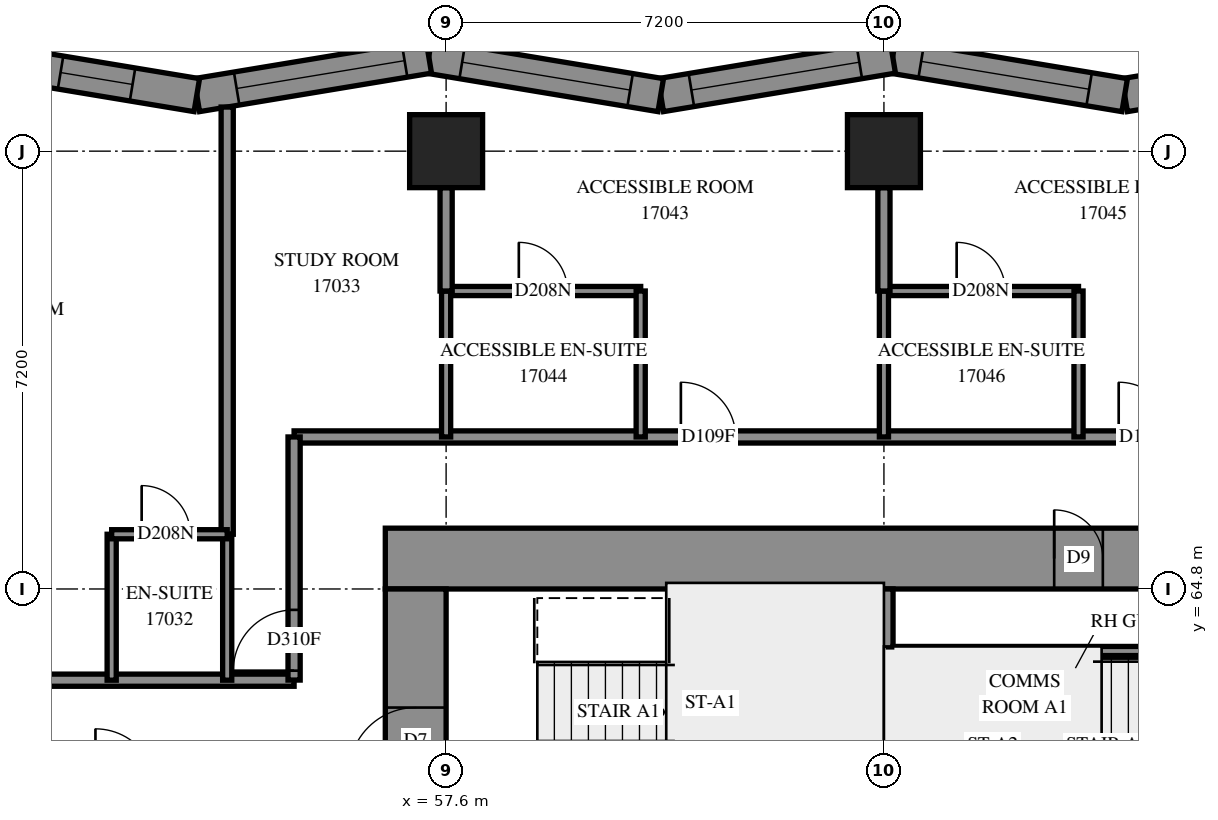
"""IFC4 building model, lengths in metres.
Left out: names, types, materials, properties, quantities, classifications, styles, units other than length and angle.
Written with IfcOpenShell. Run it as: python <this file> out.ifc"""

import sys

from ifc_helpers import new_model, si_unit, direction, frame, frame_2d, origin, origin_2d, place, context, subcontext, project, spatial, polyline, rectangle, outline, extrude, element, fill, save


model = new_model("IFC4")
c1 = context("Model", 3, precision=1e-05, world=origin(), true_north=direction((0.0, 1.0)))
c2 = subcontext(c1, "Body", "Model", "MODEL_VIEW")
j1 = project(units=[si_unit("LENGTHUNIT", "METRE"), si_unit("PLANEANGLEUNIT", "RADIAN")], contexts=[c1])
p1 = place(None, origin())
s1 = spatial("IfcSite", under=j1, at=p1, CompositionType="ELEMENT")
p2 = place(p1, origin())
s2 = spatial("IfcBuilding", under=s1, at=p2, CompositionType="ELEMENT")
p3 = place(p2, frame((0.0, 0.0, 64.4)))
s3 = spatial("IfcBuildingStorey", under=s2, at=p3, CompositionType="ELEMENT", Elevation=64.4)
for number, where, z_axis, x_axis in (
    (1, (57.6, 72.0, 0.0), (0.0, 0.0, 1.0), (1.0, 0.0, 0.0)),
    (2, (64.8, 72.0, 0.0), (0.0, 0.0, 1.0), (1.0, 0.0, 0.0)),
):
    element("IfcColumn", number, at=place(p3, frame(where, z_axis=z_axis, x_axis=x_axis)), inside=s3, PredefinedType="COLUMN", context=c2, shape_type="SweptSolid", body=[
        extrude(rectangle(XDim=1.2, YDim=1.2, at=origin_2d()), origin(), (0.0, 0.0, 1.0), 3.1),
    ])
p4 = place(p3, frame((56.6, 65.3, -0.3), z_axis=(0.0, 0.0, 1.0), x_axis=(1.0, 0.0, 0.0)))
e3 = element("IfcWall", 3, at=p4, inside=s3, PredefinedType="SHEAR", context=c2, shape_type="SweptSolid", body=[
    extrude(rectangle(XDim=16.4, YDim=1.0, at=frame_2d((8.2, 0.0))), origin(), (0.0, 0.0, 1.0), 2.7),
])
p5 = place(p4, frame((11.0, 0.0, 0.3)))
e4 = element("IfcOpeningElement", 4, at=p5, cuts=e3, PredefinedType="OPENING", context=c2, shape_type="SweptSolid", body=[
    extrude(rectangle(XDim=0.8, YDim=2.1, at=frame_2d((0.4, 1.05))), frame((0.0, 0.51, 0.0), z_axis=(0.0, -1.0, 0.0), x_axis=(1.0, 0.0, 0.0)), (0.0, 0.0, 1.0), 1.02),
])
p6 = place(p3, frame((57.1, 50.4, -0.3), z_axis=(0.0, 0.0, 1.0), x_axis=(0.0, 1.0, 0.0)))
e5 = element("IfcWall", 5, at=p6, inside=s3, PredefinedType="SHEAR", context=c2, shape_type="SweptSolid", body=[
    extrude(rectangle(XDim=14.4, YDim=1.0, at=frame_2d((7.2, 0.0))), origin(), (0.0, 0.0, 1.0), 2.7),
])
p7 = place(p6, frame((4.55, 0.0, 0.3)))
e6 = element("IfcOpeningElement", 6, at=p7, cuts=e5, PredefinedType="OPENING", context=c2, shape_type="SweptSolid", body=[
    extrude(rectangle(XDim=1.1, YDim=2.1, at=frame_2d((0.55, 1.05))), frame((0.0, 0.51, 0.0), z_axis=(0.0, -1.0, 0.0), x_axis=(1.0, 0.0, 0.0)), (0.0, 0.0, 1.0), 1.02),
])
p8 = place(p6, frame((11.35, 0.0, 0.3)))
e7 = element("IfcOpeningElement", 7, at=p8, cuts=e5, PredefinedType="OPENING", context=c2, shape_type="SweptSolid", body=[
    extrude(rectangle(XDim=1.1, YDim=2.1, at=frame_2d((0.55, 1.05))), frame((0.0, 0.51, 0.0), z_axis=(0.0, -1.0, 0.0), x_axis=(1.0, 0.0, 0.0)), (0.0, 0.0, 1.0), 1.02),
])
p9 = place(p3, frame((64.8, 60.6, 0.0), z_axis=(0.0, 0.0, 1.0), x_axis=(0.0, 1.0, 0.0)))
e8 = element("IfcWall", 8, at=p9, inside=s3, PredefinedType="SOLIDWALL", context=c2, shape_type="SweptSolid", body=[
    extrude(rectangle(XDim=4.2, YDim=0.3, at=frame_2d((2.1, 0.0))), origin(), (0.0, 0.0, 1.0), 3.1),
])
p10 = place(p3, frame((72.574, 73.554, 0.0), z_axis=(0.0, 0.0, 1.0), x_axis=(-0.9865110911, -0.1636944324, 0.0)))
e9 = element("IfcWall", 9, at=p10, inside=s3, PredefinedType="SOLIDWALL", context=c2, shape_type="SweptSolid", body=[
    extrude(outline(polyline([(-0.046, -0.275), (3.821, -0.275), (3.913, 0.275), (0.046, 0.275), (-0.046, -0.275)])), origin(), (0.0, 0.0, 1.0), 3.1),
])
p11 = place(p10, frame((0.724, 0.0, 0.5)))
e10 = element("IfcOpeningElement", 10, at=p11, cuts=e9, PredefinedType="OPENING", context=c2, shape_type="SweptSolid", body=[
    extrude(rectangle(XDim=2.8, YDim=2.45, at=frame_2d((1.4, 1.225))), frame((0.0, 0.285, 0.0), z_axis=(0.0, -1.0, 0.0), x_axis=(1.0, 0.0, 0.0)), (0.0, 0.0, 1.0), 0.57),
])
p12 = place(p3, frame((68.759, 72.921, 0.0), z_axis=(0.0, 0.0, 1.0), x_axis=(-0.9865110911, 0.1636944324, 0.0)))
e11 = element("IfcWall", 11, at=p12, inside=s3, PredefinedType="SOLIDWALL", context=c2, shape_type="SweptSolid", body=[
    extrude(outline(polyline([(0.046, -0.275), (3.913, -0.275), (3.821, 0.275), (-0.046, 0.275), (0.046, -0.275)])), origin(), (0.0, 0.0, 1.0), 3.1),
])
p13 = place(p12, frame((0.593, 0.0, 0.5)))
e12 = element("IfcOpeningElement", 12, at=p13, cuts=e11, PredefinedType="OPENING", context=c2, shape_type="SweptSolid", body=[
    extrude(rectangle(XDim=2.8, YDim=2.45, at=frame_2d((1.4, 1.225))), frame((0.0, 0.285, 0.0), z_axis=(0.0, -1.0, 0.0), x_axis=(1.0, 0.0, 0.0)), (0.0, 0.0, 1.0), 0.57),
])
p14 = place(p3, frame((64.944, 73.554, 0.0), z_axis=(0.0, 0.0, 1.0), x_axis=(-0.9865103981, -0.1636986085, 0.0)))
e13 = element("IfcWall", 13, at=p14, inside=s3, PredefinedType="SOLIDWALL", context=c2, shape_type="SweptSolid", body=[
    extrude(outline(polyline([(-0.046, -0.275), (3.821, -0.275), (3.913, 0.275), (0.046, 0.275), (-0.046, -0.275)])), origin(), (0.0, 0.0, 1.0), 3.1),
])
p15 = place(p14, frame((0.556, 0.0, 0.5)))
e14 = element("IfcOpeningElement", 14, at=p15, cuts=e13, PredefinedType="OPENING", context=c2, shape_type="SweptSolid", body=[
    extrude(rectangle(XDim=2.8, YDim=2.45, at=frame_2d((1.4, 1.225))), frame((0.0, 0.285, 0.0), z_axis=(0.0, -1.0, 0.0), x_axis=(1.0, 0.0, 0.0)), (0.0, 0.0, 1.0), 0.57),
])
p16 = place(p3, frame((61.13, 72.921, 0.0), z_axis=(0.0, 0.0, 1.0), x_axis=(-0.9865110911, 0.1636944324, 0.0)))
e15 = element("IfcWall", 15, at=p16, inside=s3, PredefinedType="SOLIDWALL", context=c2, shape_type="SweptSolid", body=[
    extrude(outline(polyline([(0.046, -0.275), (3.913, -0.275), (3.821, 0.275), (-0.046, 0.275), (0.046, -0.275)])), origin(), (0.0, 0.0, 1.0), 3.1),
])
p17 = place(p16, frame((0.511, 0.0, 0.5)))
e16 = element("IfcOpeningElement", 16, at=p17, cuts=e15, PredefinedType="OPENING", context=c2, shape_type="SweptSolid", body=[
    extrude(rectangle(XDim=2.8, YDim=2.45, at=frame_2d((1.4, 1.225))), frame((0.0, 0.285, 0.0), z_axis=(0.0, -1.0, 0.0), x_axis=(1.0, 0.0, 0.0)), (0.0, 0.0, 1.0), 0.57),
])
p18 = place(p3, frame((57.315, 73.554, 0.0), z_axis=(0.0, 0.0, 1.0), x_axis=(-0.9865110911, -0.1636944324, 0.0)))
e17 = element("IfcWall", 17, at=p18, inside=s3, PredefinedType="SOLIDWALL", context=c2, shape_type="SweptSolid", body=[
    extrude(outline(polyline([(-0.046, -0.275), (3.821, -0.275), (3.913, 0.275), (0.046, 0.275), (-0.046, -0.275)])), origin(), (0.0, 0.0, 1.0), 3.1),
])
p19 = place(p18, frame((0.403, 0.0, 0.5)))
e18 = element("IfcOpeningElement", 18, at=p19, cuts=e17, PredefinedType="OPENING", context=c2, shape_type="SweptSolid", body=[
    extrude(rectangle(XDim=2.8, YDim=2.45, at=frame_2d((1.4, 1.225))), frame((0.0, 0.285, 0.0), z_axis=(0.0, -1.0, 0.0), x_axis=(1.0, 0.0, 0.0)), (0.0, 0.0, 1.0), 0.57),
])
p20 = place(p3, frame((53.5, 72.921, 0.0), z_axis=(0.0, 0.0, 1.0), x_axis=(-0.9865110911, 0.1636944324, 0.0)))
e19 = element("IfcWall", 19, at=p20, inside=s3, PredefinedType="SOLIDWALL", context=c2, shape_type="SweptSolid", body=[
    extrude(outline(polyline([(0.046, -0.275), (3.913, -0.275), (3.821, 0.275), (-0.046, 0.275), (0.046, -0.275)])), origin(), (0.0, 0.0, 1.0), 3.1),
])
p21 = place(p20, frame((1.071, 0.0, 0.5)))
e20 = element("IfcOpeningElement", 20, at=p21, cuts=e19, PredefinedType="OPENING", context=c2, shape_type="SweptSolid", body=[
    extrude(rectangle(XDim=1.2, YDim=2.45, at=frame_2d((0.6, 1.225))), frame((0.0, 0.285, 0.0), z_axis=(0.0, -1.0, 0.0), x_axis=(1.0, 0.0, 0.0)), (0.0, 0.0, 1.0), 0.57),
])
p22 = place(p3, frame((64.95, 63.78, 0.0), z_axis=(0.0, 0.0, 1.0), x_axis=(1.0, 0.0, 0.0)))
e21 = element("IfcWall", 21, at=p22, inside=s3, PredefinedType="PARTITIONING", context=c2, shape_type="SweptSolid", body=[
    extrude(rectangle(XDim=6.9, YDim=0.15, at=frame_2d((3.45, 0.0))), origin(), (0.0, 0.0, 1.0), 3.1),
])
p23 = place(p3, frame((33.302, 63.3, 0.0), z_axis=(0.0, 0.0, 1.0), x_axis=(1.0, 0.0, 0.0)))
e22 = element("IfcWall", 22, at=p23, inside=s3, PredefinedType="PARTITIONING", context=c2, shape_type="SweptSolid", body=[
    extrude(rectangle(XDim=21.798, YDim=0.2, at=frame_2d((10.899, 0.0))), origin(), (0.0, 0.0, 1.0), 3.1),
])
p24 = place(p23, frame((1.091, 0.0, 0.0)))
e23 = element("IfcOpeningElement", 23, at=p24, cuts=e22, PredefinedType="OPENING", context=c2, shape_type="SweptSolid", body=[
    extrude(rectangle(XDim=0.9, YDim=2.1, at=frame_2d((0.45, 1.05))), frame((0.0, 0.11, 0.0), z_axis=(0.0, -1.0, 0.0), x_axis=(1.0, 0.0, 0.0)), (0.0, 0.0, 1.0), 0.22),
])
p25 = place(p23, frame((8.248, 0.0, 0.0)))
e24 = element("IfcOpeningElement", 24, at=p25, cuts=e22, PredefinedType="OPENING", context=c2, shape_type="SweptSolid", body=[
    extrude(rectangle(XDim=0.9, YDim=2.1, at=frame_2d((0.45, 1.05))), frame((0.0, 0.11, 0.0), z_axis=(0.0, -1.0, 0.0), x_axis=(1.0, 0.0, 0.0)), (0.0, 0.0, 1.0), 0.22),
])
p26 = place(p23, frame((15.448, 0.0, 0.0)))
e25 = element("IfcOpeningElement", 25, at=p26, cuts=e22, PredefinedType="OPENING", context=c2, shape_type="SweptSolid", body=[
    extrude(rectangle(XDim=0.9, YDim=2.1, at=frame_2d((0.45, 1.05))), frame((0.0, 0.11, 0.0), z_axis=(0.0, -1.0, 0.0), x_axis=(1.0, 0.0, 0.0)), (0.0, 0.0, 1.0), 0.22),
])
p27 = place(p3, frame((55.1, 67.3, 0.0), z_axis=(0.0, 0.0, 1.0), x_axis=(1.0, 0.0, 0.0)))
e26 = element("IfcWall", 26, at=p27, inside=s3, PredefinedType="PARTITIONING", context=c2, shape_type="SweptSolid", body=[
    extrude(rectangle(XDim=19.4, YDim=0.2, at=frame_2d((9.7, 0.0))), origin(), (0.0, 0.0, 1.0), 3.1),
])
p28 = place(p27, frame((6.361, 0.0, 0.0)))
e27 = element("IfcOpeningElement", 27, at=p28, cuts=e26, PredefinedType="OPENING", context=c2, shape_type="SweptSolid", body=[
    extrude(rectangle(XDim=0.9, YDim=2.1, at=frame_2d((0.45, 1.05))), frame((0.0, 0.11, 0.0), z_axis=(0.0, -1.0, 0.0), x_axis=(1.0, 0.0, 0.0)), (0.0, 0.0, 1.0), 0.22),
])
p29 = place(p27, frame((13.561, 0.0, 0.0)))
e28 = element("IfcOpeningElement", 28, at=p29, cuts=e26, PredefinedType="OPENING", context=c2, shape_type="SweptSolid", body=[
    extrude(rectangle(XDim=0.9, YDim=2.1, at=frame_2d((0.45, 1.05))), frame((0.0, 0.11, 0.0), z_axis=(0.0, -1.0, 0.0), x_axis=(1.0, 0.0, 0.0)), (0.0, 0.0, 1.0), 0.22),
])
p30 = place(p3, frame((54.0, 65.7, 0.0), z_axis=(0.0, 0.0, 1.0), x_axis=(0.0, 1.0, 0.0)))
e29 = element("IfcWall", 29, at=p30, inside=s3, PredefinedType="PARTITIONING", context=c2, shape_type="SweptSolid", body=[
    extrude(rectangle(XDim=7.025, YDim=0.2, at=frame_2d((3.513, 0.0))), origin(), (0.0, 0.0, 1.0), 3.1),
])
p31 = place(p3, frame((55.1, 63.302, 0.0), z_axis=(0.0, 0.0, 1.0), x_axis=(0.0, 1.0, 0.0)))
e30 = element("IfcWall", 30, at=p31, inside=s3, PredefinedType="PARTITIONING", context=c2, shape_type="SweptSolid", body=[
    extrude(rectangle(XDim=3.998, YDim=0.2, at=frame_2d((1.999, 0.0))), origin(), (0.0, 0.0, 1.0), 3.1),
])
p32 = place(p31, frame((0.154, 0.0, 0.0)))
e31 = element("IfcOpeningElement", 31, at=p32, cuts=e30, PredefinedType="OPENING", context=c2, shape_type="SweptSolid", body=[
    extrude(rectangle(XDim=1.0, YDim=2.1, at=frame_2d((0.5, 1.05))), frame((0.0, 0.11, 0.0), z_axis=(0.0, -1.0, 0.0), x_axis=(1.0, 0.0, 0.0)), (0.0, 0.0, 1.0), 0.22),
])
p33 = place(p3, frame((64.8, 69.7, 0.0), z_axis=(0.0, 0.0, 1.0), x_axis=(1.0, 0.0, 0.0)))
e32 = element("IfcWall", 32, at=p33, inside=s3, PredefinedType="PARTITIONING", context=c2, shape_type="SweptSolid", body=[
    extrude(rectangle(XDim=3.2, YDim=0.15, at=frame_2d((1.6, 0.0))), origin(), (0.0, 0.0, 1.0), 3.1),
])
p34 = place(p33, frame((1.196, 0.0, 0.0)))
e33 = element("IfcOpeningElement", 33, at=p34, cuts=e32, PredefinedType="OPENING", context=c2, shape_type="SweptSolid", body=[
    extrude(rectangle(XDim=0.8, YDim=2.1, at=frame_2d((0.4, 1.05))), frame((0.0, 0.085, 0.0), z_axis=(0.0, -1.0, 0.0), x_axis=(1.0, 0.0, 0.0)), (0.0, 0.0, 1.0), 0.17),
])
p35 = place(p3, frame((57.6, 69.7, 0.0), z_axis=(0.0, 0.0, 1.0), x_axis=(1.0, 0.0, 0.0)))
e34 = element("IfcWall", 34, at=p35, inside=s3, PredefinedType="PARTITIONING", context=c2, shape_type="SweptSolid", body=[
    extrude(rectangle(XDim=3.2, YDim=0.15, at=frame_2d((1.6, 0.0))), origin(), (0.0, 0.0, 1.0), 3.1),
])
p36 = place(p35, frame((1.196, 0.0, 0.0)))
e35 = element("IfcOpeningElement", 35, at=p36, cuts=e34, PredefinedType="OPENING", context=c2, shape_type="SweptSolid", body=[
    extrude(rectangle(XDim=0.8, YDim=2.1, at=frame_2d((0.4, 1.05))), frame((0.0, 0.085, 0.0), z_axis=(0.0, -1.0, 0.0), x_axis=(1.0, 0.0, 0.0)), (0.0, 0.0, 1.0), 0.17),
])
for number, where, z_axis, x_axis in (
    (36, (52.1, 63.3, 0.0), (0.0, 0.0, 1.0), (0.0, 1.0, 0.0)),
    (37, (54.0, 63.3, 0.0), (0.0, 0.0, 1.0), (0.0, 1.0, 0.0)),
    (38, (57.6, 67.3, 0.0), (0.0, 0.0, 1.0), (0.0, 1.0, 0.0)),
    (39, (60.8, 67.3, 0.0), (0.0, 0.0, 1.0), (0.0, 1.0, 0.0)),
    (40, (68.0, 67.3, 0.0), (0.0, 0.0, 1.0), (0.0, 1.0, 0.0)),
    (41, (64.8, 67.3, 0.0), (0.0, 0.0, 1.0), (0.0, 1.0, 0.0)),
):
    element("IfcWall", number, at=place(p3, frame(where, z_axis=z_axis, x_axis=x_axis)), inside=s3, PredefinedType="PARTITIONING", context=c2, shape_type="SweptSolid", body=[
        extrude(rectangle(XDim=2.4, YDim=0.15, at=frame_2d((1.2, 0.0))), origin(), (0.0, 0.0, 1.0), 3.1),
    ])
p37 = place(p3, frame((52.1, 65.7, 0.0), z_axis=(0.0, 0.0, 1.0), x_axis=(1.0, 0.0, 0.0)))
e42 = element("IfcWall", 42, at=p37, inside=s3, PredefinedType="PARTITIONING", context=c2, shape_type="SweptSolid", body=[
    extrude(rectangle(XDim=1.9, YDim=0.15, at=frame_2d((0.95, 0.0))), origin(), (0.0, 0.0, 1.0), 3.1),
])
p38 = place(p37, frame((0.493, 0.0, 0.0)))
e43 = element("IfcOpeningElement", 43, at=p38, cuts=e42, PredefinedType="OPENING", context=c2, shape_type="SweptSolid", body=[
    extrude(rectangle(XDim=0.8, YDim=2.1, at=frame_2d((0.4, 1.05))), frame((0.0, 0.085, 0.0), z_axis=(0.0, -1.0, 0.0), x_axis=(1.0, 0.0, 0.0)), (0.0, 0.0, 1.0), 0.17),
])
for number, where, z_axis, x_axis in (
    (44, (57.6, 69.7, 0.0), (0.0, 0.0, 1.0), (0.0, 1.0, 0.0)),
    (45, (64.8, 69.7, 0.0), (0.0, 0.0, 1.0), (0.0, 1.0, 0.0)),
):
    element("IfcWall", number, at=place(p3, frame(where, z_axis=z_axis, x_axis=x_axis)), inside=s3, PredefinedType="PARTITIONING", context=c2, shape_type="SweptSolid", body=[
        extrude(rectangle(XDim=1.7, YDim=0.2, at=frame_2d((0.85, 0.0))), origin(), (0.0, 0.0, 1.0), 3.1),
    ])
p39 = place(p13, origin())
e46 = element("IfcWindow", 46, at=p39, inside=s3, PartitioningType="SINGLE_PANEL", PredefinedType="WINDOW", context=c2, shape_type="SweptSolid", body=[
    extrude(rectangle(XDim=2.8, YDim=2.45, at=frame_2d((1.4, 1.225))), frame((0.0, 0.155, 0.0), z_axis=(0.0, -1.0, 0.0), x_axis=(1.0, 0.0, 0.0)), (0.0, 0.0, 1.0), 0.06),
])
fill(e12, e46)
p40 = place(p15, origin())
e47 = element("IfcWindow", 47, at=p40, inside=s3, PartitioningType="SINGLE_PANEL", PredefinedType="WINDOW", context=c2, shape_type="SweptSolid", body=[
    extrude(rectangle(XDim=2.8, YDim=2.45, at=frame_2d((1.4, 1.225))), frame((0.0, 0.155, 0.0), z_axis=(0.0, -1.0, 0.0), x_axis=(1.0, 0.0, 0.0)), (0.0, 0.0, 1.0), 0.06),
])
fill(e14, e47)
p41 = place(p17, origin())
e48 = element("IfcWindow", 48, at=p41, inside=s3, PartitioningType="SINGLE_PANEL", PredefinedType="WINDOW", context=c2, shape_type="SweptSolid", body=[
    extrude(rectangle(XDim=2.8, YDim=2.45, at=frame_2d((1.4, 1.225))), frame((0.0, 0.155, 0.0), z_axis=(0.0, -1.0, 0.0), x_axis=(1.0, 0.0, 0.0)), (0.0, 0.0, 1.0), 0.06),
])
fill(e16, e48)
p42 = place(p19, origin())
e49 = element("IfcWindow", 49, at=p42, inside=s3, PartitioningType="SINGLE_PANEL", PredefinedType="WINDOW", context=c2, shape_type="SweptSolid", body=[
    extrude(rectangle(XDim=2.8, YDim=2.45, at=frame_2d((1.4, 1.225))), frame((0.0, 0.155, 0.0), z_axis=(0.0, -1.0, 0.0), x_axis=(1.0, 0.0, 0.0)), (0.0, 0.0, 1.0), 0.06),
])
fill(e18, e49)
p43 = place(p21, origin())
e50 = element("IfcWindow", 50, at=p43, inside=s3, PartitioningType="SINGLE_PANEL", PredefinedType="WINDOW", context=c2, shape_type="SweptSolid", body=[
    extrude(rectangle(XDim=1.2, YDim=2.45, at=frame_2d((0.6, 1.225))), frame((0.0, 0.155, 0.0), z_axis=(0.0, -1.0, 0.0), x_axis=(1.0, 0.0, 0.0)), (0.0, 0.0, 1.0), 0.06),
])
fill(e20, e50)
p44 = place(p5, origin())
e51 = element("IfcDoor", 51, at=p44, inside=s3, OperationType="SINGLE_SWING_RIGHT", PredefinedType="DOOR", context=c2, shape_type="SweptSolid", body=[
    extrude(rectangle(XDim=0.8, YDim=2.1, at=frame_2d((0.4, 1.05))), frame((0.0, -0.44, 0.0), z_axis=(0.0, -1.0, 0.0), x_axis=(1.0, 0.0, 0.0)), (0.0, 0.0, 1.0), 0.05),
])
fill(e4, e51)
p45 = place(p8, origin())
e52 = element("IfcDoor", 52, at=p45, inside=s3, OperationType="SINGLE_SWING_LEFT", PredefinedType="DOOR", context=c2, shape_type="SweptSolid", body=[
    extrude(rectangle(XDim=1.1, YDim=2.1, at=frame_2d((0.55, 1.05))), frame((0.0, 0.025, 0.0), z_axis=(0.0, -1.0, 0.0), x_axis=(1.0, 0.0, 0.0)), (0.0, 0.0, 1.0), 0.05),
])
fill(e7, e52)
p46 = place(p38, origin())
e53 = element("IfcDoor", 53, at=p46, inside=s3, OperationType="SINGLE_SWING_RIGHT", PredefinedType="DOOR", context=c2, shape_type="SweptSolid", body=[
    extrude(rectangle(XDim=0.8, YDim=2.1, at=frame_2d((0.4, 1.05))), frame((0.0, 0.025, 0.0), z_axis=(0.0, -1.0, 0.0), x_axis=(1.0, 0.0, 0.0)), (0.0, 0.0, 1.0), 0.05),
])
fill(e43, e53)
p47 = place(p32, origin())
e54 = element("IfcDoor", 54, at=p47, inside=s3, OperationType="SINGLE_SWING_LEFT", PredefinedType="DOOR", context=c2, shape_type="SweptSolid", body=[
    extrude(rectangle(XDim=1.0, YDim=2.1, at=frame_2d((0.5, 1.05))), frame((0.0, 0.025, 0.0), z_axis=(0.0, -1.0, 0.0), x_axis=(1.0, 0.0, 0.0)), (0.0, 0.0, 1.0), 0.05),
])
fill(e31, e54)
p48 = place(p28, origin())
e55 = element("IfcDoor", 55, at=p48, inside=s3, OperationType="SINGLE_SWING_RIGHT", PredefinedType="DOOR", context=c2, shape_type="SweptSolid", body=[
    extrude(rectangle(XDim=0.9, YDim=2.1, at=frame_2d((0.45, 1.05))), frame((0.0, 0.025, 0.0), z_axis=(0.0, -1.0, 0.0), x_axis=(1.0, 0.0, 0.0)), (0.0, 0.0, 1.0), 0.05),
])
fill(e27, e55)
p49 = place(p36, origin())
e56 = element("IfcDoor", 56, at=p49, inside=s3, OperationType="SINGLE_SWING_RIGHT", PredefinedType="DOOR", context=c2, shape_type="SweptSolid", body=[
    extrude(rectangle(XDim=0.8, YDim=2.1, at=frame_2d((0.4, 1.05))), frame((0.0, 0.025, 0.0), z_axis=(0.0, -1.0, 0.0), x_axis=(1.0, 0.0, 0.0)), (0.0, 0.0, 1.0), 0.05),
])
fill(e35, e56)
p50 = place(p29, origin())
e57 = element("IfcDoor", 57, at=p50, inside=s3, OperationType="SINGLE_SWING_RIGHT", PredefinedType="DOOR", context=c2, shape_type="SweptSolid", body=[
    extrude(rectangle(XDim=0.9, YDim=2.1, at=frame_2d((0.45, 1.05))), frame((0.0, 0.025, 0.0), z_axis=(0.0, -1.0, 0.0), x_axis=(1.0, 0.0, 0.0)), (0.0, 0.0, 1.0), 0.05),
])
fill(e28, e57)
p51 = place(p34, origin())
e58 = element("IfcDoor", 58, at=p51, inside=s3, OperationType="SINGLE_SWING_RIGHT", PredefinedType="DOOR", context=c2, shape_type="SweptSolid", body=[
    extrude(rectangle(XDim=0.8, YDim=2.1, at=frame_2d((0.4, 1.05))), frame((0.0, 0.025, 0.0), z_axis=(0.0, -1.0, 0.0), x_axis=(1.0, 0.0, 0.0)), (0.0, 0.0, 1.0), 0.05),
])
fill(e33, e58)
save(model, sys.argv[1])
